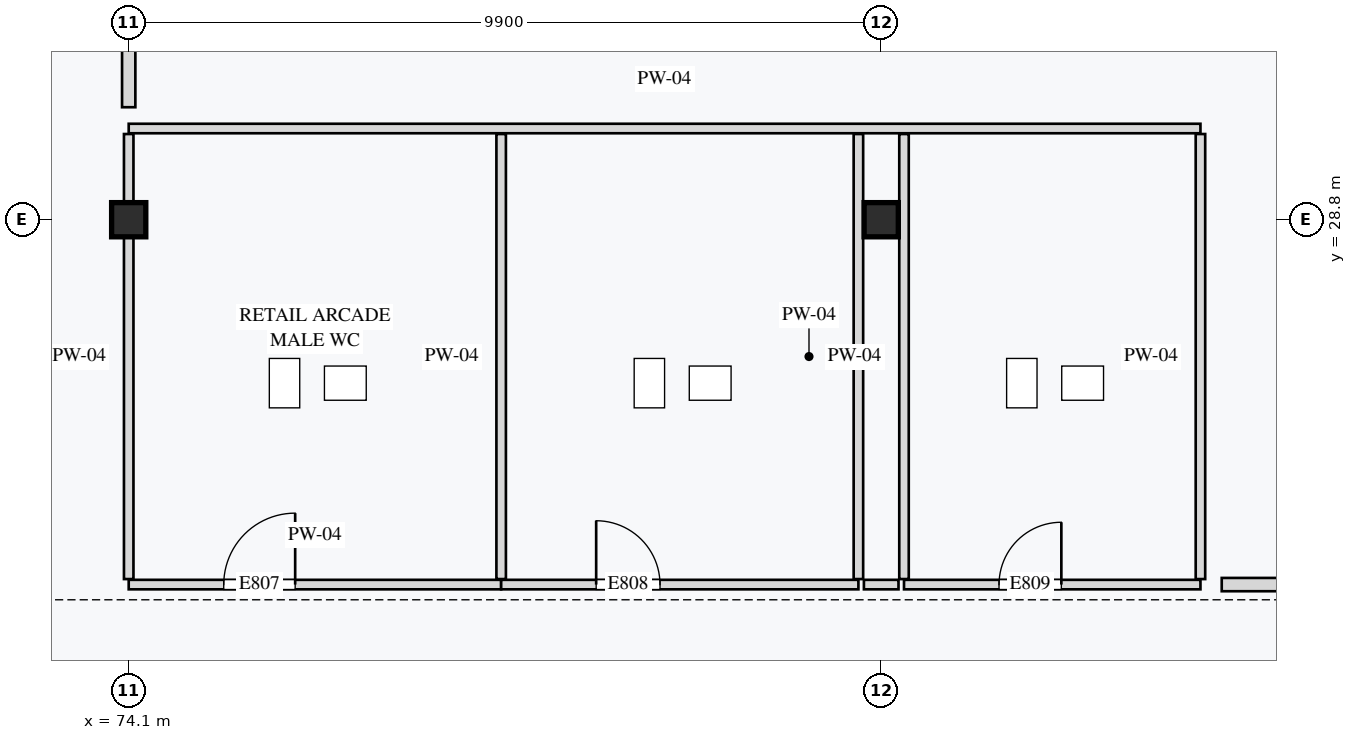
"""IFC4 building model, lengths in metres.
Left out: names, types, materials, properties, quantities, classifications, styles, units other than length and angle.
Written with IfcOpenShell. Run it as: python <this file> out.ifc"""

import sys

from ifc_helpers import new_model, si_unit, direction, frame, frame_2d, origin, origin_2d, place, context, subcontext, project, spatial, rectangle, extrude, element, fill, save


model = new_model("IFC4")
c1 = context("Model", 3, precision=1e-05, world=origin(), true_north=direction((0.0, 1.0)))
c2 = subcontext(c1, "Body", "Model", "MODEL_VIEW")
j1 = project(units=[si_unit("LENGTHUNIT", "METRE"), si_unit("PLANEANGLEUNIT", "RADIAN")], contexts=[c1])
p1 = place(None, origin())
s1 = spatial("IfcSite", under=j1, at=p1, CompositionType="ELEMENT")
p2 = place(p1, origin())
s2 = spatial("IfcBuilding", under=s1, at=p2, CompositionType="ELEMENT")
p3 = place(p2, origin())
s3 = spatial("IfcBuildingStorey", under=s2, at=p3, CompositionType="ELEMENT", Elevation=0.0)
for number, where, z_axis, x_axis in (
    (1, (74.1, 28.8, 0.0), (0.0, 0.0, 1.0), (1.0, 0.0, 0.0)),
    (2, (84.0, 28.8, 0.0), (0.0, 0.0, 1.0), (1.0, 0.0, 0.0)),
):
    element("IfcColumn", number, at=place(p3, frame(where, z_axis=z_axis, x_axis=x_axis)), inside=s3, PredefinedType="COLUMN", context=c2, shape_type="SweptSolid", body=[
        extrude(rectangle(XDim=0.45, YDim=0.45, at=origin_2d()), origin(), (0.0, 0.0, 1.0), 4.2),
    ])
p4 = place(p3, frame((88.48, 24.0, 0.0), z_axis=(0.0, 0.0, 1.0), x_axis=(1.0, 0.0, 0.0)))
e3 = element("IfcWall", 3, at=p4, inside=s3, PredefinedType="PARTITIONING", context=c2, shape_type="SweptSolid", body=[
    extrude(rectangle(XDim=22.64, YDim=0.175, at=frame_2d((11.32, 0.0))), origin(), (0.0, 0.0, 1.0), 3.92),
])
p5 = place(p3, frame((74.1, 30.28, 0.0), z_axis=(0.0, 0.0, 1.0), x_axis=(0.0, 1.0, 0.0)))
e4 = element("IfcWall", 4, at=p5, inside=s3, PredefinedType="PARTITIONING", context=c2, shape_type="SweptSolid", body=[
    extrude(rectangle(XDim=18.24, YDim=0.175, at=frame_2d((9.12, 0.0))), origin(), (0.0, 0.0, 1.0), 3.92),
])
p6 = place(p3, frame((74.1, 30.0, 0.0), z_axis=(0.0, 0.0, 1.0), x_axis=(1.0, 0.0, 0.0)))
e5 = element("IfcWall", 5, at=p6, inside=s3, PredefinedType="PARTITIONING", context=c2, shape_type="SweptSolid", body=[
    extrude(rectangle(XDim=14.1, YDim=0.125, at=frame_2d((7.05, 0.0))), origin(), (0.0, 0.0, 1.0), 3.92),
])
p7 = place(p3, frame((74.1, 24.0, 0.0), z_axis=(0.0, 0.0, 1.0), x_axis=(1.0, 0.0, 0.0)))
e6 = element("IfcWall", 6, at=p7, inside=s3, PredefinedType="PARTITIONING", context=c2, shape_type="SweptSolid", body=[
    extrude(rectangle(XDim=4.9, YDim=0.125, at=frame_2d((2.45, 0.0))), origin(), (0.0, 0.0, 1.0), 3.92),
])
p8 = place(p7, frame((1.25, 0.0, 0.0)))
e7 = element("IfcOpeningElement", 7, at=p8, cuts=e6, PredefinedType="OPENING", context=c2, shape_type="SweptSolid", body=[
    extrude(rectangle(XDim=0.94, YDim=2.08, at=frame_2d((0.47, 1.04))), frame((0.0, 0.073, 0.0), z_axis=(0.0, -1.0, 0.0), x_axis=(1.0, 0.0, 0.0)), (0.0, 0.0, 1.0), 0.145),
])
p9 = place(p3, frame((74.1, 24.073, 0.0), z_axis=(0.0, 0.0, 1.0), x_axis=(0.0, 1.0, 0.0)))
e8 = element("IfcWall", 8, at=p9, inside=s3, PredefinedType="PARTITIONING", context=c2, shape_type="SweptSolid", body=[
    extrude(rectangle(XDim=5.855, YDim=0.125, at=frame_2d((2.927, 0.0))), origin(), (0.0, 0.0, 1.0), 3.92),
])
p10 = place(p3, frame((79.0, 24.0, 0.0), z_axis=(0.0, 0.0, 1.0), x_axis=(1.0, 0.0, 0.0)))
e9 = element("IfcWall", 9, at=p10, inside=s3, PredefinedType="PARTITIONING", context=c2, shape_type="SweptSolid", body=[
    extrude(rectangle(XDim=4.7, YDim=0.125, at=frame_2d((2.35, 0.0))), origin(), (0.0, 0.0, 1.0), 3.92),
])
p11 = place(p10, frame((1.25, 0.0, 0.0)))
e10 = element("IfcOpeningElement", 10, at=p11, cuts=e9, PredefinedType="OPENING", context=c2, shape_type="SweptSolid", body=[
    extrude(rectangle(XDim=0.84, YDim=2.06, at=frame_2d((0.42, 1.03))), frame((0.0, 0.073, 0.0), z_axis=(0.0, -1.0, 0.0), x_axis=(1.0, 0.0, 0.0)), (0.0, 0.0, 1.0), 0.145),
])
p12 = place(p3, frame((79.0, 24.073, 0.0), z_axis=(0.0, 0.0, 1.0), x_axis=(0.0, 1.0, 0.0)))
e11 = element("IfcWall", 11, at=p12, inside=s3, PredefinedType="PARTITIONING", context=c2, shape_type="SweptSolid", body=[
    extrude(rectangle(XDim=5.855, YDim=0.125, at=frame_2d((2.927, 0.0))), origin(), (0.0, 0.0, 1.0), 3.92),
])
p13 = place(p3, frame((84.3, 24.0, 0.0), z_axis=(0.0, 0.0, 1.0), x_axis=(1.0, 0.0, 0.0)))
e12 = element("IfcWall", 12, at=p13, inside=s3, PredefinedType="PARTITIONING", context=c2, shape_type="SweptSolid", body=[
    extrude(rectangle(XDim=3.9, YDim=0.125, at=frame_2d((1.95, 0.0))), origin(), (0.0, 0.0, 1.0), 3.92),
])
p14 = place(p13, frame((1.25, 0.0, 0.0)))
e13 = element("IfcOpeningElement", 13, at=p14, cuts=e12, PredefinedType="OPENING", context=c2, shape_type="SweptSolid", body=[
    extrude(rectangle(XDim=0.82, YDim=2.05, at=frame_2d((0.41, 1.025))), frame((0.0, 0.073, 0.0), z_axis=(0.0, -1.0, 0.0), x_axis=(1.0, 0.0, 0.0)), (0.0, 0.0, 1.0), 0.145),
])
for number, where, z_axis, x_axis in (
    (14, (84.3, 24.073, 0.0), (0.0, 0.0, 1.0), (0.0, 1.0, 0.0)),
    (15, (83.7, 24.073, 0.0), (0.0, 0.0, 1.0), (0.0, 1.0, 0.0)),
):
    element("IfcWall", number, at=place(p3, frame(where, z_axis=z_axis, x_axis=x_axis)), inside=s3, PredefinedType="PARTITIONING", context=c2, shape_type="SweptSolid", body=[
        extrude(rectangle(XDim=5.855, YDim=0.125, at=frame_2d((2.927, 0.0))), origin(), (0.0, 0.0, 1.0), 3.92),
    ])
p15 = place(p3, frame((83.772, 24.0, 0.0), z_axis=(0.0, 0.0, 1.0), x_axis=(1.0, 0.0, 0.0)))
e16 = element("IfcWall", 16, at=p15, inside=s3, PredefinedType="PARTITIONING", context=c2, shape_type="SweptSolid", body=[
    extrude(rectangle(XDim=0.455, YDim=0.125, at=frame_2d((0.228, 0.0))), origin(), (0.0, 0.0, 1.0), 3.92),
])
p16 = place(p3, frame((88.2, 24.073, 0.0), z_axis=(0.0, 0.0, 1.0), x_axis=(0.0, 1.0, 0.0)))
e17 = element("IfcWall", 17, at=p16, inside=s3, PredefinedType="PARTITIONING", context=c2, shape_type="SweptSolid", body=[
    extrude(rectangle(XDim=5.855, YDim=0.125, at=frame_2d((2.927, 0.0))), origin(), (0.0, 0.0, 1.0), 3.92),
])
p17 = place(p8, origin())
e18 = element("IfcDoor", 18, at=p17, inside=s3, OperationType="SINGLE_SWING_RIGHT", PredefinedType="DOOR", context=c2, shape_type="SweptSolid", body=[
    extrude(rectangle(XDim=0.94, YDim=2.08, at=frame_2d((0.47, 1.04))), frame((0.0, 0.025, 0.0), z_axis=(0.0, -1.0, 0.0), x_axis=(1.0, 0.0, 0.0)), (0.0, 0.0, 1.0), 0.05),
])
fill(e7, e18)
p18 = place(p11, origin())
e19 = element("IfcDoor", 19, at=p18, inside=s3, OperationType="SINGLE_SWING_LEFT", PredefinedType="DOOR", context=c2, shape_type="SweptSolid", body=[
    extrude(rectangle(XDim=0.84, YDim=2.06, at=frame_2d((0.42, 1.03))), frame((0.0, 0.025, 0.0), z_axis=(0.0, -1.0, 0.0), x_axis=(1.0, 0.0, 0.0)), (0.0, 0.0, 1.0), 0.05),
])
fill(e10, e19)
p19 = place(p14, origin())
e20 = element("IfcDoor", 20, at=p19, inside=s3, OperationType="SINGLE_SWING_RIGHT", PredefinedType="DOOR", context=c2, shape_type="SweptSolid", body=[
    extrude(rectangle(XDim=0.82, YDim=2.05, at=frame_2d((0.41, 1.025))), frame((0.0, 0.025, 0.0), z_axis=(0.0, -1.0, 0.0), x_axis=(1.0, 0.0, 0.0)), (0.0, 0.0, 1.0), 0.05),
])
fill(e13, e20)
save(model, sys.argv[1])
